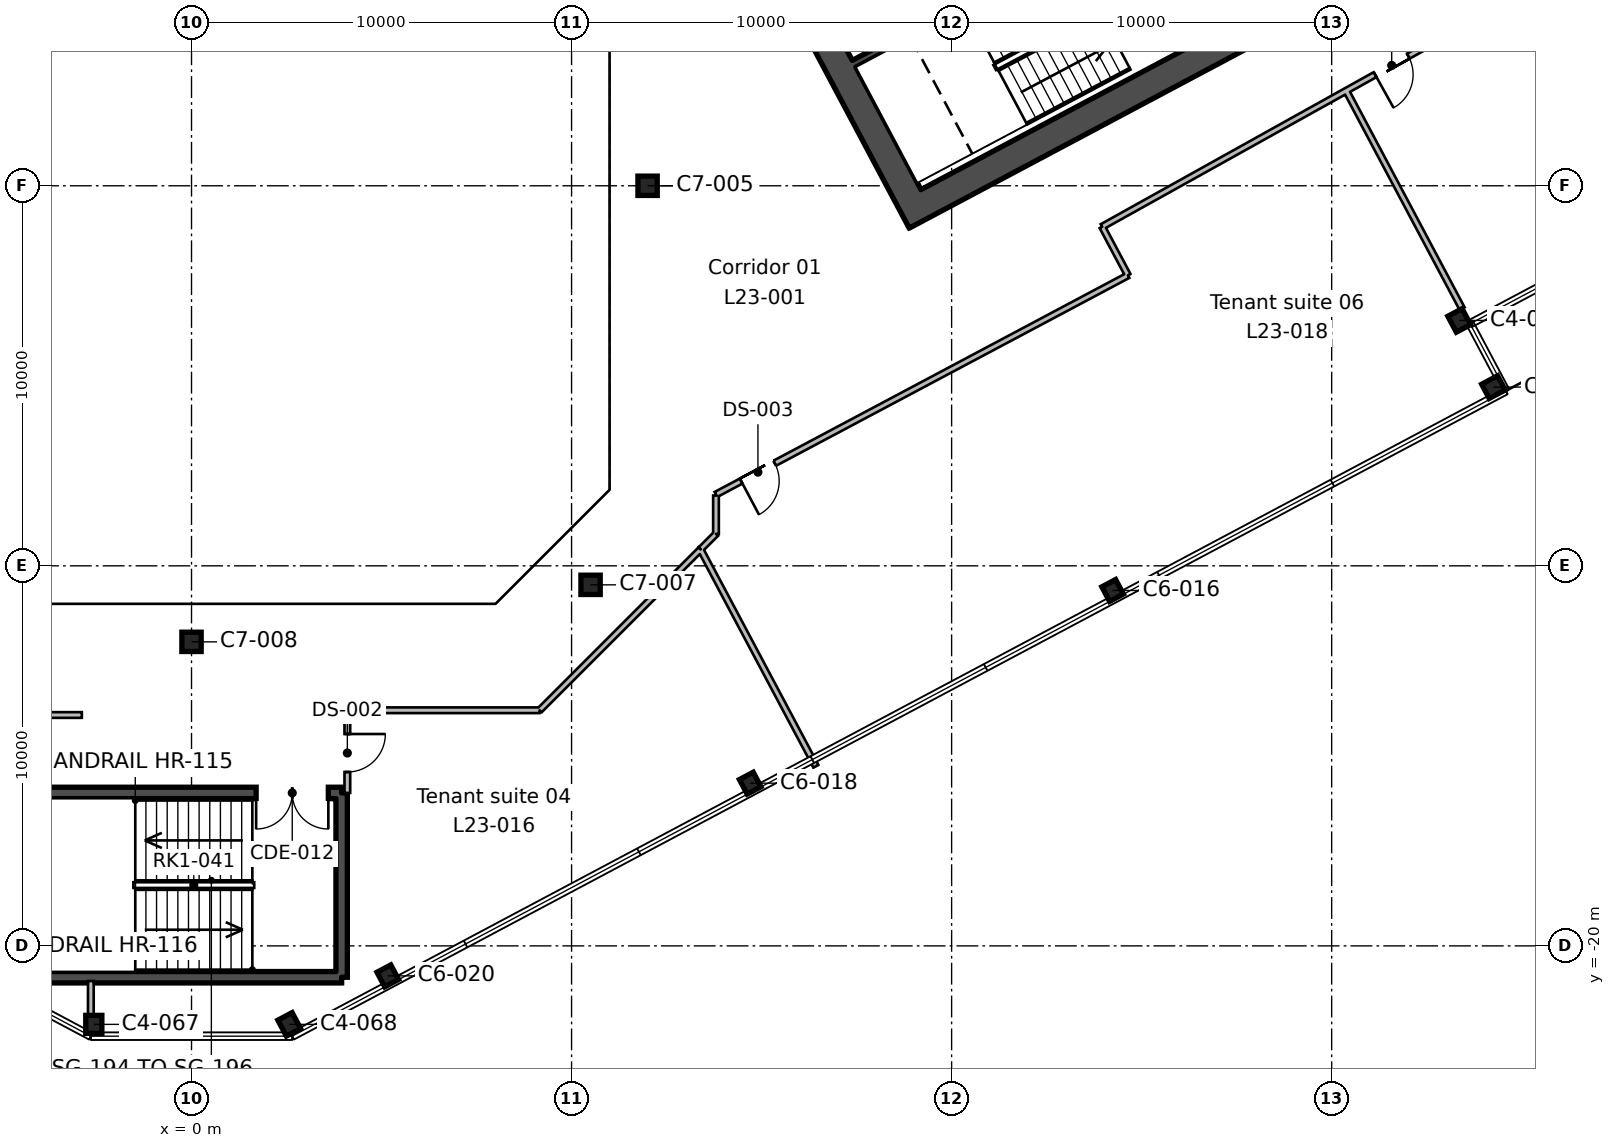
"""IFC4 building model, lengths in metres.
Left out: names, types, materials, properties, quantities, classifications, styles, units other than length and angle.
Written with IfcOpenShell. Run it as: python <this file> out.ifc"""

import sys

from ifc_helpers import new_model, si_unit, direction, frame, frame_2d, origin, origin_2d, place, context, subcontext, project, spatial, rectangle, hollow_rectangle, i_section, extrude, element, fill, save


model = new_model("IFC4")
c1 = context("Model", 3, precision=1e-05, world=origin(), true_north=direction((0.0, 1.0)))
c2 = subcontext(c1, "Body", "Model", "MODEL_VIEW")
j1 = project(units=[si_unit("LENGTHUNIT", "METRE"), si_unit("PLANEANGLEUNIT", "RADIAN")], contexts=[c1])
p1 = place(None, origin())
s1 = spatial("IfcSite", under=j1, at=p1, CompositionType="ELEMENT")
p2 = place(p1, origin())
s2 = spatial("IfcBuilding", under=s1, at=p2, CompositionType="ELEMENT")
p3 = place(p2, frame((0.0, 0.0, 118.2)))
s3 = spatial("IfcBuildingStorey", under=s2, at=p3, CompositionType="ELEMENT", Elevation=118.2)
for number, where, z_axis, x_axis in (
    (1, (-2.571, -22.065, 0.0), (0.0, 0.0, 1.0), (1.0, 0.0, 0.0)),
    (2, (2.571, -22.065, 0.0), (0.0, 0.0, 1.0), (0.883, 0.469, 0.0)),
):
    element("IfcColumn", number, at=place(p3, frame(where, z_axis=z_axis, x_axis=x_axis)), inside=s3, PredefinedType="COLUMN", context=c2, shape_type="SweptSolid", body=[
        extrude(i_section(OverallWidth=0.424, OverallDepth=0.475, WebThickness=0.048, FlangeThickness=0.077, FilletRadius=0.015, at=origin_2d()), origin(), (0.0, 0.0, 1.0), 4.0),
    ])
for number, where, z_axis, x_axis in (
    (3, (5.164, -20.789, 0.0), (0.0, 0.0, 1.0), (0.883, 0.469, 0.0)),
    (4, (14.7, -15.719, 0.0), (0.0, 0.0, 1.0), (0.883, 0.469, 0.0)),
):
    element("IfcColumn", number, at=place(p3, frame(where, z_axis=z_axis, x_axis=x_axis)), inside=s3, PredefinedType="COLUMN", context=c2, shape_type="SweptSolid", body=[
        extrude(i_section(OverallWidth=0.412, OverallDepth=0.434, WebThickness=0.036, FlangeThickness=0.057, FilletRadius=0.015, at=origin_2d()), origin(), (0.0, 0.0, 1.0), 4.0),
    ])
p4 = place(p3, frame((0.0, -12.0, 0.0), z_axis=(0.0, 0.0, 1.0), x_axis=(1.0, 0.0, 0.0)))
e5 = element("IfcColumn", 5, at=p4, inside=s3, PredefinedType="COLUMN", context=c2, shape_type="SweptSolid", body=[
    extrude(hollow_rectangle(XDim=0.508, YDim=0.508, WallThickness=0.012, InnerFilletRadius=0.006, OuterFilletRadius=0.018, at=origin_2d()), origin(), (0.0, 0.0, 1.0), 4.0),
])
p5 = place(p3, frame((24.236, -10.648, 0.0), z_axis=(0.0, 0.0, 1.0), x_axis=(0.882947592859, 0.469471562786, 0.0)))
e6 = element("IfcColumn", 6, at=p5, inside=s3, PredefinedType="COLUMN", context=c2, shape_type="SweptSolid", body=[
    extrude(i_section(OverallWidth=0.412, OverallDepth=0.434, WebThickness=0.036, FlangeThickness=0.057, FilletRadius=0.015, at=origin_2d()), origin(), (0.0, 0.0, 1.0), 4.0),
])
p6 = place(p3, frame((10.5, -10.5, 0.0), z_axis=(0.0, 0.0, 1.0), x_axis=(1.0, 0.0, 0.0)))
e7 = element("IfcColumn", 7, at=p6, inside=s3, PredefinedType="COLUMN", context=c2, shape_type="SweptSolid", body=[
    extrude(hollow_rectangle(XDim=0.508, YDim=0.508, WallThickness=0.012, InnerFilletRadius=0.006, OuterFilletRadius=0.018, at=origin_2d()), origin(), (0.0, 0.0, 1.0), 4.0),
])
for number, where, z_axis, x_axis in (
    (8, (34.256, -5.297, 0.0), (0.0, 0.0, 1.0), (-0.469, 0.883, 0.0)),
    (9, (33.356, -3.543, 0.0), (0.0, 0.0, 1.0), (0.883, 0.469, 0.0)),
):
    element("IfcColumn", number, at=place(p3, frame(where, z_axis=z_axis, x_axis=x_axis)), inside=s3, PredefinedType="COLUMN", context=c2, shape_type="SweptSolid", body=[
        extrude(i_section(OverallWidth=0.424, OverallDepth=0.475, WebThickness=0.048, FlangeThickness=0.077, FilletRadius=0.015, at=origin_2d()), origin(), (0.0, 0.0, 1.0), 4.0),
    ])
p7 = place(p3, frame((12.0, 0.0, 0.0), z_axis=(0.0, 0.0, 1.0), x_axis=(1.0, 0.0, 0.0)))
e10 = element("IfcColumn", 10, at=p7, inside=s3, PredefinedType="COLUMN", context=c2, shape_type="SweptSolid", body=[
    extrude(hollow_rectangle(XDim=0.508, YDim=0.508, WallThickness=0.012, InnerFilletRadius=0.006, OuterFilletRadius=0.018, at=origin_2d()), origin(), (0.0, 0.0, 1.0), 4.0),
])
p8 = place(p3, frame((19.215, -0.939, 0.0), z_axis=(0.0, 0.0, 1.0), x_axis=(-0.469479580143, 0.882943329908, 0.0)))
e11 = element("IfcWall", 11, at=p8, inside=s3, PredefinedType="SHEAR", context=c2, shape_type="SweptSolid", body=[
    extrude(rectangle(XDim=19.7, YDim=0.75, at=frame_2d((9.85, 0.0))), origin(), (0.0, 0.0, 1.0), 4.0),
])
p9 = place(p8, frame((6.85, 0.0, 0.0)))
e12 = element("IfcOpeningElement", 12, at=p9, cuts=e11, PredefinedType="OPENING", context=c2, shape_type="SweptSolid", body=[
    extrude(rectangle(XDim=2.4, YDim=2.4, at=frame_2d((1.2, 1.2))), frame((0.0, 0.385, 0.0), z_axis=(0.0, -1.0, 0.0), x_axis=(1.0, 0.0, 0.0)), (0.0, 0.0, 1.0), 0.77),
])
p10 = place(p3, frame((19.37, -0.432, 0.0), z_axis=(0.0, 0.0, 1.0), x_axis=(0.88294509198, 0.469476266226, 0.0)))
e13 = element("IfcWall", 13, at=p10, inside=s3, PredefinedType="SHEAR", context=c2, shape_type="SweptSolid", body=[
    extrude(rectangle(XDim=20.2, YDim=0.75, at=frame_2d((10.1, 0.0))), origin(), (0.0, 0.0, 1.0), 4.0),
])
p11 = place(p3, frame((17.434, 3.21, 0.0), z_axis=(0.0, 0.0, 1.0), x_axis=(0.882940221191, 0.469485426614, 0.0)))
e14 = element("IfcWall", 14, at=p11, inside=s3, PredefinedType="SHEAR", context=c2, shape_type="SweptSolid", body=[
    extrude(rectangle(XDim=8.0, YDim=0.2, at=frame_2d((4.0, 0.0))), origin(), (0.0, 0.0, 1.0), 4.0),
])
p12 = place(p3, frame((3.95, -15.975, 0.0), z_axis=(0.0, 0.0, 1.0), x_axis=(0.0, -1.0, 0.0)))
e15 = element("IfcWall", 15, at=p12, inside=s3, PredefinedType="SHEAR", context=c2, shape_type="SweptSolid", body=[
    extrude(rectangle(XDim=4.85, YDim=0.3, at=frame_2d((2.425, 0.0))), origin(), (0.0, 0.0, 1.0), 4.0),
])
p13 = place(p3, frame((3.95, -20.825, 0.0), z_axis=(0.0, 0.0, 1.0), x_axis=(-1.0, 0.0, 0.0)))
e16 = element("IfcWall", 16, at=p13, inside=s3, PredefinedType="SHEAR", context=c2, shape_type="SweptSolid", body=[
    extrude(rectangle(XDim=8.3, YDim=0.3, at=frame_2d((4.15, 0.0))), origin(), (0.0, 0.0, 1.0), 4.0),
])
p14 = place(p3, frame((-4.35, -15.975, 0.0), z_axis=(0.0, 0.0, 1.0), x_axis=(1.0, 0.0, 0.0)))
e17 = element("IfcWall", 17, at=p14, inside=s3, PredefinedType="SHEAR", context=c2, shape_type="SweptSolid", body=[
    extrude(rectangle(XDim=8.3, YDim=0.3, at=frame_2d((4.15, 0.0))), origin(), (0.0, 0.0, 1.0), 4.0),
])
p15 = place(p14, frame((6.05, 0.0, 0.0)))
e18 = element("IfcOpeningElement", 18, at=p15, cuts=e17, PredefinedType="OPENING", context=c2, shape_type="SweptSolid", body=[
    extrude(rectangle(XDim=1.9, YDim=2.1, at=frame_2d((0.95, 1.05))), frame((0.0, 0.16, 0.0), z_axis=(0.0, -1.0, 0.0), x_axis=(1.0, 0.0, 0.0)), (0.0, 0.0, 1.0), 0.32),
])
p16 = place(p3, frame((-4.49, -13.925, 0.0), z_axis=(0.0, 0.0, 1.0), x_axis=(1.0, 0.0, 0.0)))
e19 = element("IfcWall", 19, at=p16, inside=s3, PredefinedType="PARTITIONING", context=c2, shape_type="SweptSolid", body=[
    extrude(rectangle(XDim=1.604, YDim=0.15, at=frame_2d((0.802, 0.0))), origin(), (0.0, 0.0, 1.0), 3.64),
])
p17 = place(p3, frame((-2.649, -21.828, 0.0), z_axis=(0.0, 0.0, 1.0), x_axis=(0.0, 1.0, 0.0)))
e20 = element("IfcWall", 20, at=p17, inside=s3, PredefinedType="PARTITIONING", context=c2, shape_type="SweptSolid", body=[
    extrude(rectangle(XDim=0.903, YDim=0.15, at=frame_2d((0.451, 0.0))), origin(), (0.0, 0.0, 1.0), 3.64),
])
p18 = place(p3, frame((4.1, -15.975, 0.0), z_axis=(0.0, 0.0, 1.0), x_axis=(0.0, 1.0, 0.0)))
e21 = element("IfcWall", 21, at=p18, inside=s3, PredefinedType="PARTITIONING", context=c2, shape_type="SweptSolid", body=[
    extrude(rectangle(XDim=2.15, YDim=0.15, at=frame_2d((1.075, 0.0))), origin(), (0.0, 0.0, 1.0), 3.64),
])
p19 = place(p18, frame((0.55, 0.0, 0.0)))
e22 = element("IfcOpeningElement", 22, at=p19, cuts=e21, PredefinedType="OPENING", context=c2, shape_type="SweptSolid", body=[
    extrude(rectangle(XDim=1.0, YDim=2.1, at=frame_2d((0.5, 1.05))), frame((0.0, 0.085, 0.0), z_axis=(0.0, -1.0, 0.0), x_axis=(1.0, 0.0, 0.0)), (0.0, 0.0, 1.0), 0.17),
])
p20 = place(p3, frame((5.303, -13.8, 0.0), z_axis=(0.0, 0.0, 1.0), x_axis=(-1.0, 0.0, 0.0)))
e23 = element("IfcWall", 23, at=p20, inside=s3, PredefinedType="PARTITIONING", context=c2, shape_type="SweptSolid", body=[
    extrude(rectangle(XDim=1.353, YDim=0.15, at=frame_2d((0.677, 0.0))), origin(), (0.0, 0.0, 1.0), 3.64),
])
p21 = place(p3, frame((13.393, -9.567, 0.0), z_axis=(0.0, 0.0, 1.0), x_axis=(-0.707106781187, -0.707106781187, 0.0)))
e24 = element("IfcWall", 24, at=p21, inside=s3, PredefinedType="PARTITIONING", context=c2, shape_type="SweptSolid", body=[
    extrude(rectangle(XDim=5.987, YDim=0.15, at=frame_2d((2.993, 0.0))), origin(), (0.0, 0.0, 1.0), 3.64),
])
p22 = place(p3, frame((9.16, -13.8, 0.0), z_axis=(0.0, 0.0, 1.0), x_axis=(-1.0, 0.0, 0.0)))
e25 = element("IfcWall", 25, at=p22, inside=s3, PredefinedType="PARTITIONING", context=c2, shape_type="SweptSolid", body=[
    extrude(rectangle(XDim=3.857, YDim=0.15, at=frame_2d((1.928, 0.0))), origin(), (0.0, 0.0, 1.0), 3.64),
])
p23 = place(p3, frame((13.393, -9.567, 0.0), z_axis=(0.0, 0.0, 1.0), x_axis=(0.469578527863, -0.882890710207, 0.0)))
e26 = element("IfcWall", 26, at=p23, inside=s3, PredefinedType="PARTITIONING", context=c2, shape_type="SweptSolid", body=[
    extrude(rectangle(XDim=6.465, YDim=0.15, at=frame_2d((3.232, 0.0))), origin(), (0.0, 0.0, 1.0), 3.64),
])
p24 = place(p3, frame((13.8, -8.15, 0.0), z_axis=(0.0, 0.0, 1.0), x_axis=(0.0, -1.0, 0.0)))
e27 = element("IfcWall", 27, at=p24, inside=s3, PredefinedType="PARTITIONING", context=c2, shape_type="SweptSolid", body=[
    extrude(rectangle(XDim=1.01, YDim=0.15, at=frame_2d((0.505, 0.0))), origin(), (0.0, 0.0, 1.0), 3.64),
])
p25 = place(p3, frame((13.8, -9.16, 0.0), z_axis=(0.0, 0.0, 1.0), x_axis=(-0.707106781187, -0.707106781187, 0.0)))
e28 = element("IfcWall", 28, at=p25, inside=s3, PredefinedType="PARTITIONING", context=c2, shape_type="SweptSolid", body=[
    extrude(rectangle(XDim=0.57, YDim=0.15, at=frame_2d((0.285, 0.0))), origin(), (0.0, 0.0, 1.0), 3.64),
])
p26 = place(p3, frame((13.8, -8.122, 0.0), z_axis=(0.0, 0.0, 1.0), x_axis=(0.883005513351, 0.469362613969, 0.0)))
e29 = element("IfcWall", 29, at=p26, inside=s3, PredefinedType="PARTITIONING", context=c2, shape_type="SweptSolid", body=[
    extrude(rectangle(XDim=2.41, YDim=0.15, at=frame_2d((1.205, 0.0))), origin(), (0.0, 0.0, 1.0), 3.64),
])
p27 = place(p26, frame((0.75, 0.0, 0.0)))
e30 = element("IfcOpeningElement", 30, at=p27, cuts=e29, PredefinedType="OPENING", context=c2, shape_type="SweptSolid", body=[
    extrude(rectangle(XDim=1.0, YDim=2.1, at=frame_2d((0.5, 1.05))), frame((0.0, 0.085, 0.0), z_axis=(0.0, -1.0, 0.0), x_axis=(1.0, 0.0, 0.0)), (0.0, 0.0, 1.0), 0.17),
])
p28 = place(p3, frame((23.961, -1.079, 0.0), z_axis=(0.0, 0.0, 1.0), x_axis=(0.469590610022, -0.882884284025, 0.0)))
e31 = element("IfcWall", 31, at=p28, inside=s3, PredefinedType="PARTITIONING", context=c2, shape_type="SweptSolid", body=[
    extrude(rectangle(XDim=1.448, YDim=0.15, at=frame_2d((0.724, 0.0))), origin(), (0.0, 0.0, 1.0), 3.64),
])
p29 = place(p3, frame((24.641, -2.358, 0.0), z_axis=(0.0, 0.0, 1.0), x_axis=(-0.882939162052, -0.469487418484, 0.0)))
e32 = element("IfcWall", 32, at=p29, inside=s3, PredefinedType="PARTITIONING", context=c2, shape_type="SweptSolid", body=[
    extrude(rectangle(XDim=9.868, YDim=0.15, at=frame_2d((4.934, 0.0))), origin(), (0.0, 0.0, 1.0), 3.64),
])
p30 = place(p3, frame((30.383, 2.501, 0.0), z_axis=(0.0, 0.0, 1.0), x_axis=(0.469417215036, -0.882976487925, 0.0)))
e33 = element("IfcWall", 33, at=p30, inside=s3, PredefinedType="PARTITIONING", context=c2, shape_type="SweptSolid", body=[
    extrude(rectangle(XDim=6.495, YDim=0.15, at=frame_2d((3.248, 0.0))), origin(), (0.0, 0.0, 1.0), 3.64),
])
p31 = place(p3, frame((39.137, 7.378, 0.0), z_axis=(0.0, 0.0, 1.0), x_axis=(-0.873590594154, -0.486661559819, 0.0)))
e34 = element("IfcWall", 34, at=p31, inside=s3, PredefinedType="PARTITIONING", context=c2, shape_type="SweptSolid", body=[
    extrude(rectangle(XDim=17.373, YDim=0.15, at=frame_2d((8.687, 0.0))), origin(), (0.0, 0.0, 1.0), 3.64),
])
p32 = place(p31, frame((8.151, 0.0, 0.0)))
e35 = element("IfcOpeningElement", 35, at=p32, cuts=e34, PredefinedType="OPENING", context=c2, shape_type="SweptSolid", body=[
    extrude(rectangle(XDim=1.0, YDim=2.1, at=frame_2d((0.5, 1.05))), frame((0.0, 0.085, 0.0), z_axis=(0.0, -1.0, 0.0), x_axis=(1.0, 0.0, 0.0)), (0.0, 0.0, 1.0), 0.17),
])
p33 = place(p15, frame((1.9, 0.0, 0.0), z_axis=(0.0, 0.0, 1.0), x_axis=(-1.0, 0.0, 0.0)))
e36 = element("IfcDoor", 36, at=p33, inside=s3, OperationType="DOUBLE_DOOR_SINGLE_SWING", PredefinedType="DOOR", context=c2, shape_type="SweptSolid", body=[
    extrude(rectangle(XDim=1.9, YDim=2.1, at=frame_2d((0.95, 1.05))), frame((0.0, 0.025, 0.0), z_axis=(0.0, -1.0, 0.0), x_axis=(1.0, 0.0, 0.0)), (0.0, 0.0, 1.0), 0.05),
])
fill(e18, e36)
p34 = place(p19, frame((1.0, 0.0, 0.0), z_axis=(0.0, 0.0, 1.0), x_axis=(-1.0, 0.0, 0.0)))
e37 = element("IfcDoor", 37, at=p34, inside=s3, OperationType="SINGLE_SWING_LEFT", PredefinedType="DOOR", context=c2, shape_type="SweptSolid", body=[
    extrude(rectangle(XDim=1.0, YDim=2.1, at=frame_2d((0.5, 1.05))), frame((0.0, 0.025, 0.0), z_axis=(0.0, -1.0, 0.0), x_axis=(1.0, 0.0, 0.0)), (0.0, 0.0, 1.0), 0.05),
])
fill(e22, e37)
p35 = place(p27, frame((1.0, 0.0, 0.0), z_axis=(0.0, 0.0, 1.0), x_axis=(-1.0, 0.0, 0.0)))
e38 = element("IfcDoor", 38, at=p35, inside=s3, OperationType="SINGLE_SWING_RIGHT", PredefinedType="DOOR", context=c2, shape_type="SweptSolid", body=[
    extrude(rectangle(XDim=1.0, YDim=2.1, at=frame_2d((0.5, 1.05))), frame((0.0, 0.025, 0.0), z_axis=(0.0, -1.0, 0.0), x_axis=(1.0, 0.0, 0.0)), (0.0, 0.0, 1.0), 0.05),
])
fill(e30, e38)
p36 = place(p32, origin())
e39 = element("IfcDoor", 39, at=p36, inside=s3, OperationType="SINGLE_SWING_RIGHT", PredefinedType="DOOR", context=c2, shape_type="SweptSolid", body=[
    extrude(rectangle(XDim=1.0, YDim=2.1, at=frame_2d((0.5, 1.05))), frame((0.0, 0.025, 0.0), z_axis=(0.0, -1.0, 0.0), x_axis=(1.0, 0.0, 0.0)), (0.0, 0.0, 1.0), 0.05),
])
fill(e35, e39)
save(model, sys.argv[1])
